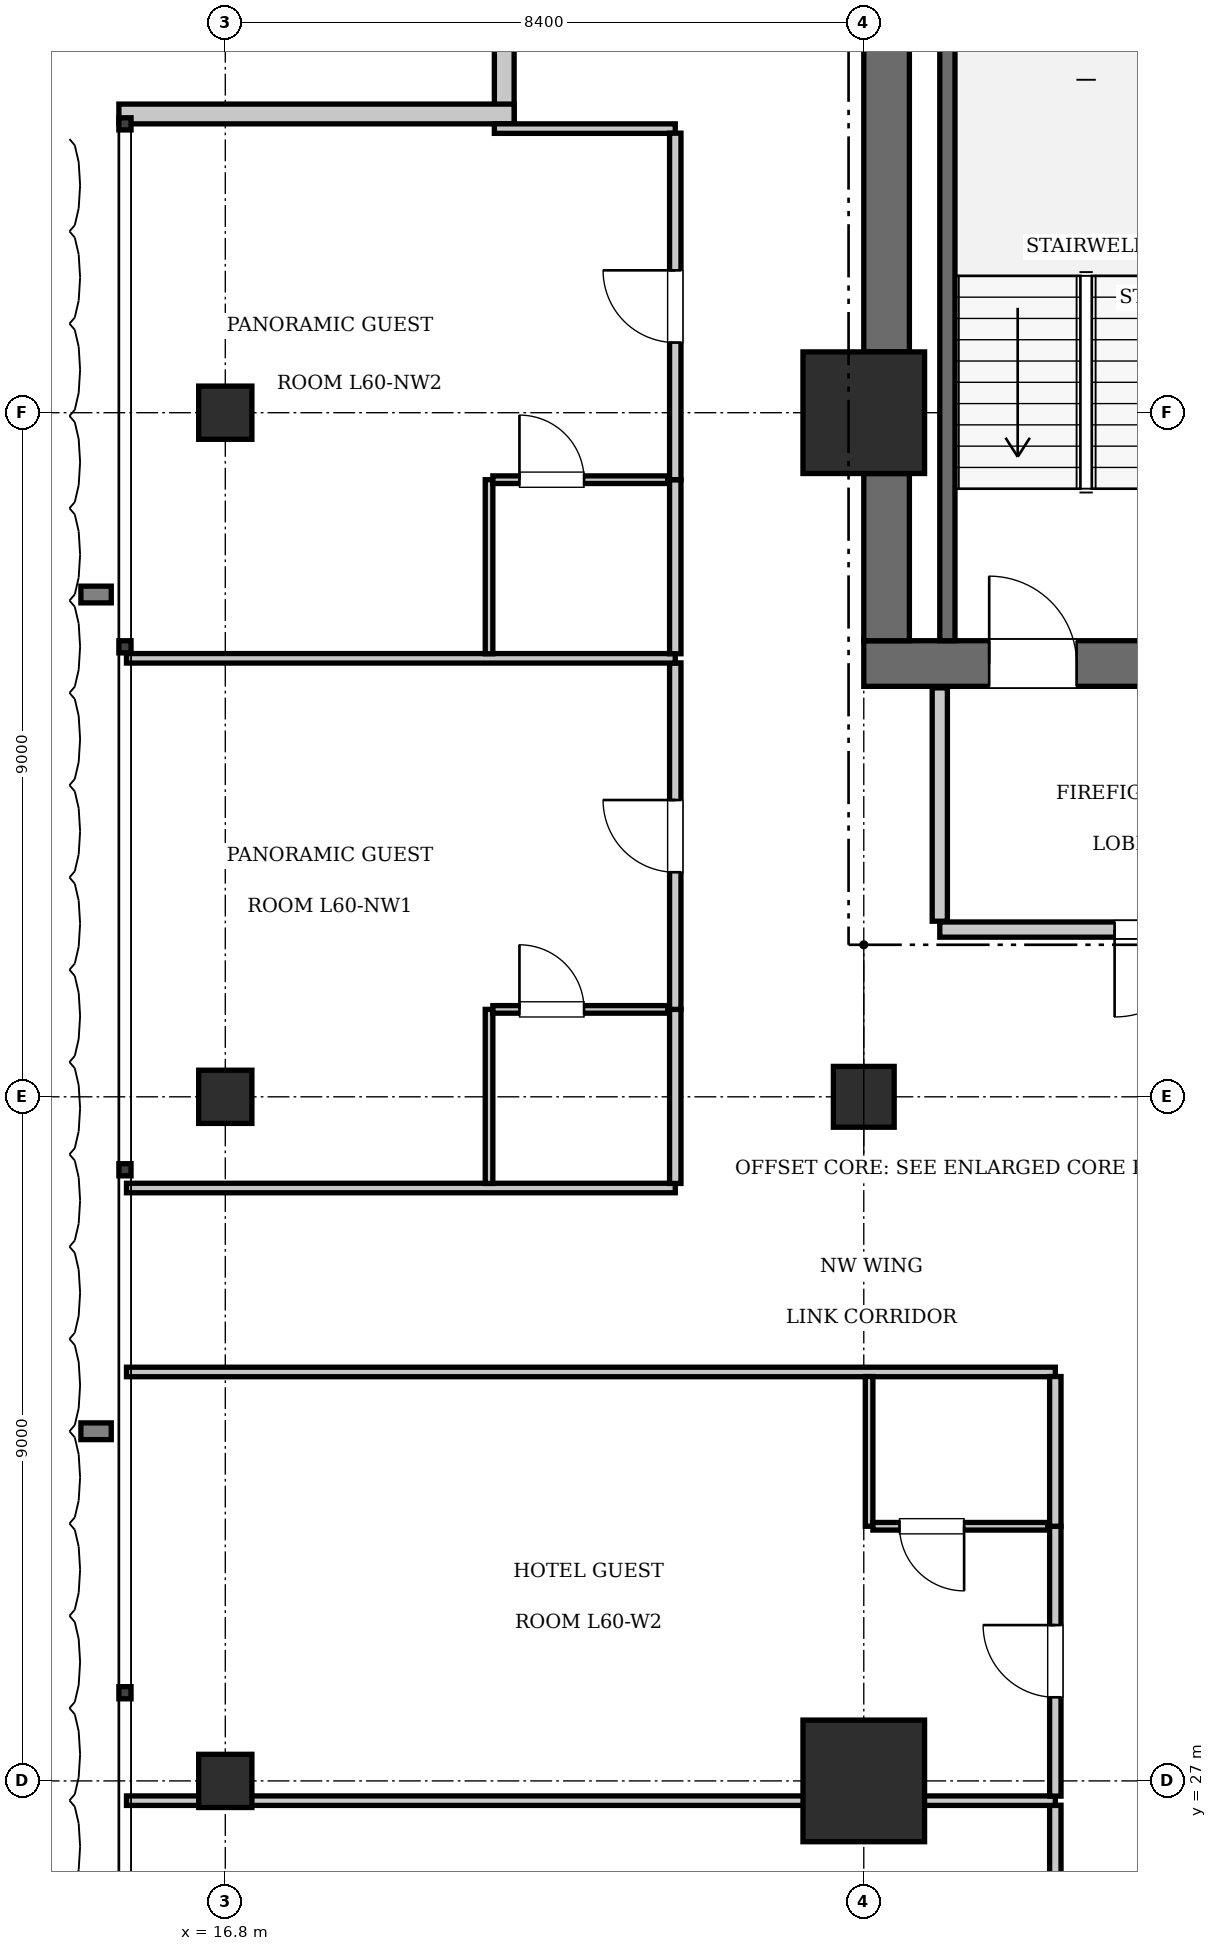
"""IFC4 building model, lengths in metres.
Left out: names, types, materials, properties, quantities, classifications, styles, units other than length and angle.
Written with IfcOpenShell. Run it as: python <this file> out.ifc"""

import sys

from ifc_helpers import new_model, si_unit, direction, frame, frame_2d, origin, origin_2d, place, context, subcontext, project, spatial, rectangle, extrude, element, fill, save


model = new_model("IFC4")
c1 = context("Model", 3, precision=1e-05, world=origin(), true_north=direction((0.0, 1.0)))
c2 = subcontext(c1, "Body", "Model", "MODEL_VIEW")
j1 = project(units=[si_unit("LENGTHUNIT", "METRE"), si_unit("PLANEANGLEUNIT", "RADIAN")], contexts=[c1])
p1 = place(None, origin())
s1 = spatial("IfcSite", under=j1, at=p1, CompositionType="ELEMENT")
p2 = place(p1, origin())
s2 = spatial("IfcBuilding", under=s1, at=p2, CompositionType="ELEMENT")
p3 = place(p2, frame((0.0, 0.0, 247.1)))
s3 = spatial("IfcBuildingStorey", under=s2, at=p3, CompositionType="ELEMENT", Elevation=247.1)
for number, where, z_axis, x_axis in (
    (1, (25.2, 27.0, 0.0), (0.0, 0.0, 1.0), (1.0, 0.0, 0.0)),
    (2, (25.2, 45.0, 0.0), (0.0, 0.0, 1.0), (1.0, 0.0, 0.0)),
):
    element("IfcColumn", number, at=place(p3, frame(where, z_axis=z_axis, x_axis=x_axis)), inside=s3, PredefinedType="COLUMN", context=c2, shape_type="SweptSolid", body=[
        extrude(rectangle(XDim=1.6, YDim=1.6, at=origin_2d()), origin(), (0.0, 0.0, 1.0), 3.85),
    ])
p4 = place(p3, frame((25.2, 41.7, 0.0), z_axis=(0.0, 0.0, 1.0), x_axis=(1.0, 0.0, 0.0)))
e3 = element("IfcWall", 3, at=p4, inside=s3, PredefinedType="SHEAR", context=c2, shape_type="SweptSolid", body=[
    extrude(rectangle(XDim=6.8, YDim=0.6, at=frame_2d((3.4, 0.0))), origin(), (0.0, 0.0, 1.0), 3.85),
])
p5 = place(p4, frame((1.65, 0.0, 0.0)))
e4 = element("IfcOpeningElement", 4, at=p5, cuts=e3, PredefinedType="OPENING", context=c2, shape_type="SweptSolid", body=[
    extrude(rectangle(XDim=1.15, YDim=2.15, at=frame_2d((0.575, 1.075))), frame((0.0, 0.31, 0.0), z_axis=(0.0, -1.0, 0.0), x_axis=(1.0, 0.0, 0.0)), (0.0, 0.0, 1.0), 0.62),
])
p6 = place(p4, frame((5.15, 0.0, 0.0)))
e5 = element("IfcOpeningElement", 5, at=p6, cuts=e3, PredefinedType="OPENING", context=c2, shape_type="SweptSolid", body=[
    extrude(rectangle(XDim=1.1, YDim=2.2, at=frame_2d((0.55, 1.1))), frame((0.0, 0.31, 0.0), z_axis=(0.0, -1.0, 0.0), x_axis=(1.0, 0.0, 0.0)), (0.0, 0.0, 1.0), 0.62),
])
p7 = place(p3, frame((25.5, 42.0, 0.0), z_axis=(0.0, 0.0, 1.0), x_axis=(0.0, 1.0, 0.0)))
e6 = element("IfcWall", 6, at=p7, inside=s3, PredefinedType="SHEAR", context=c2, shape_type="SweptSolid", body=[
    extrude(rectangle(XDim=2.2, YDim=0.6, at=frame_2d((1.1, 0.0))), origin(), (0.0, 0.0, 1.0), 3.85),
])
p8 = place(p3, frame((25.5, 45.8, 0.0), z_axis=(0.0, 0.0, 1.0), x_axis=(0.0, 1.0, 0.0)))
e7 = element("IfcWall", 7, at=p8, inside=s3, PredefinedType="SHEAR", context=c2, shape_type="SweptSolid", body=[
    extrude(rectangle(XDim=7.6, YDim=0.6, at=frame_2d((3.8, 0.0))), origin(), (0.0, 0.0, 1.0), 3.85),
])
p9 = place(p3, frame((25.2, 36.0, 0.0), z_axis=(0.0, 0.0, 1.0), x_axis=(1.0, 0.0, 0.0)))
e8 = element("IfcColumn", 8, at=p9, inside=s3, PredefinedType="COLUMN", context=c2, shape_type="SweptSolid", body=[
    extrude(rectangle(XDim=0.8, YDim=0.8, at=origin_2d()), origin(), (0.0, 0.0, 1.0), 3.85),
])
for number, where, z_axis, x_axis in (
    (9, (16.8, 27.0, 0.0), (0.0, 0.0, 1.0), (1.0, 0.0, 0.0)),
    (10, (16.8, 36.0, 0.0), (0.0, 0.0, 1.0), (1.0, 0.0, 0.0)),
    (11, (16.8, 45.0, 0.0), (0.0, 0.0, 1.0), (1.0, 0.0, 0.0)),
):
    element("IfcColumn", number, at=place(p3, frame(where, z_axis=z_axis, x_axis=x_axis)), inside=s3, PredefinedType="COLUMN", context=c2, shape_type="SweptSolid", body=[
        extrude(rectangle(XDim=0.7, YDim=0.7, at=origin_2d()), origin(), (0.0, 0.0, 1.0), 3.85),
    ])
p10 = place(p3, frame((26.3, 42.0, 0.0), z_axis=(0.0, 0.0, 1.0), x_axis=(0.0, 1.0, 0.0)))
e12 = element("IfcWall", 12, at=p10, inside=s3, PredefinedType="SOLIDWALL", context=c2, shape_type="SweptSolid", body=[
    extrude(rectangle(XDim=9.12, YDim=0.2, at=frame_2d((4.56, 0.0))), origin(), (0.0, 0.0, 1.0), 3.61),
])
p11 = place(p3, frame((20.47, 48.8, 0.0), z_axis=(0.0, 0.0, 1.0), x_axis=(0.0, 1.0, 0.0)))
e13 = element("IfcWall", 13, at=p11, inside=s3, PredefinedType="SOLIDWALL", context=c2, shape_type="SweptSolid", body=[
    extrude(rectangle(XDim=5.2, YDim=0.26, at=frame_2d((2.6, 0.0))), origin(), (0.0, 0.0, 1.0), 3.61),
])
p12 = place(p3, frame((15.4, 48.93, 0.0), z_axis=(0.0, 0.0, 1.0), x_axis=(1.0, 0.0, 0.0)))
e14 = element("IfcWall", 14, at=p12, inside=s3, PredefinedType="SOLIDWALL", context=c2, shape_type="SweptSolid", body=[
    extrude(rectangle(XDim=5.2, YDim=0.26, at=frame_2d((2.6, 0.0))), origin(), (0.0, 0.0, 1.0), 3.61),
])
p13 = place(p3, frame((26.2, 38.2, 0.0), z_axis=(0.0, 0.0, 1.0), x_axis=(1.0, 0.0, 0.0)))
e15 = element("IfcWall", 15, at=p13, inside=s3, PredefinedType="PARTITIONING", context=c2, shape_type="SweptSolid", body=[
    extrude(rectangle(XDim=5.8, YDim=0.2, at=frame_2d((2.9, 0.0))), origin(), (0.0, 0.0, 1.0), 3.61),
])
p14 = place(p13, frame((2.3, 0.0, 0.0)))
e16 = element("IfcOpeningElement", 16, at=p14, cuts=e15, PredefinedType="OPENING", context=c2, shape_type="SweptSolid", body=[
    extrude(rectangle(XDim=1.15, YDim=2.15, at=frame_2d((0.575, 1.075))), frame((0.0, 0.11, 0.0), z_axis=(0.0, -1.0, 0.0), x_axis=(1.0, 0.0, 0.0)), (0.0, 0.0, 1.0), 0.22),
])
p15 = place(p3, frame((26.2, 38.31, 0.0), z_axis=(0.0, 0.0, 1.0), x_axis=(0.0, 1.0, 0.0)))
e17 = element("IfcWall", 17, at=p15, inside=s3, PredefinedType="PARTITIONING", context=c2, shape_type="SweptSolid", body=[
    extrude(rectangle(XDim=3.07, YDim=0.2, at=frame_2d((1.535, 0.0))), origin(), (0.0, 0.0, 1.0), 3.61),
])
p16 = place(p3, frame((15.5, 32.38, 0.0), z_axis=(0.0, 0.0, 1.0), x_axis=(1.0, 0.0, 0.0)))
e18 = element("IfcWall", 18, at=p16, inside=s3, PredefinedType="PARTITIONING", context=c2, shape_type="SweptSolid", body=[
    extrude(rectangle(XDim=12.22, YDim=0.125, at=frame_2d((6.11, 0.0))), origin(), (0.0, 0.0, 1.0), 3.61),
])
p17 = place(p3, frame((27.72, 23.13, 0.0), z_axis=(0.0, 0.0, 1.0), x_axis=(0.0, 1.0, 0.0)))
e19 = element("IfcWall", 19, at=p17, inside=s3, PredefinedType="PARTITIONING", context=c2, shape_type="SweptSolid", body=[
    extrude(rectangle(XDim=3.55, YDim=0.15, at=frame_2d((1.775, 0.0))), origin(), (0.0, 0.0, 1.0), 3.61),
])
p18 = place(p17, frame((1.3, 0.0, 0.0)))
e20 = element("IfcOpeningElement", 20, at=p18, cuts=e19, PredefinedType="OPENING", context=c2, shape_type="SweptSolid", body=[
    extrude(rectangle(XDim=0.95, YDim=2.15, at=frame_2d((0.475, 1.075))), frame((0.0, 0.085, 0.0), z_axis=(0.0, -1.0, 0.0), x_axis=(1.0, 0.0, 0.0)), (0.0, 0.0, 1.0), 0.17),
])
p19 = place(p3, frame((15.5, 26.74, 0.0), z_axis=(0.0, 0.0, 1.0), x_axis=(1.0, 0.0, 0.0)))
e21 = element("IfcWall", 21, at=p19, inside=s3, PredefinedType="PARTITIONING", context=c2, shape_type="SweptSolid", body=[
    extrude(rectangle(XDim=12.22, YDim=0.125, at=frame_2d((6.11, 0.0))), origin(), (0.0, 0.0, 1.0), 2.41),
])
p20 = place(p3, frame((27.72, 26.8, 0.0), z_axis=(0.0, 0.0, 1.0), x_axis=(0.0, 1.0, 0.0)))
e22 = element("IfcWall", 22, at=p20, inside=s3, PredefinedType="PARTITIONING", context=c2, shape_type="SweptSolid", body=[
    extrude(rectangle(XDim=3.55, YDim=0.15, at=frame_2d((1.775, 0.0))), origin(), (0.0, 0.0, 1.0), 3.61),
])
p21 = place(p20, frame((1.3, 0.0, 0.0)))
e23 = element("IfcOpeningElement", 23, at=p21, cuts=e22, PredefinedType="OPENING", context=c2, shape_type="SweptSolid", body=[
    extrude(rectangle(XDim=0.95, YDim=2.15, at=frame_2d((0.475, 1.075))), frame((0.0, 0.085, 0.0), z_axis=(0.0, -1.0, 0.0), x_axis=(1.0, 0.0, 0.0)), (0.0, 0.0, 1.0), 0.17),
])
p22 = place(p3, frame((27.72, 30.35, 0.0), z_axis=(0.0, 0.0, 1.0), x_axis=(0.0, 1.0, 0.0)))
e24 = element("IfcWall", 24, at=p22, inside=s3, PredefinedType="PARTITIONING", context=c2, shape_type="SweptSolid", body=[
    extrude(rectangle(XDim=1.97, YDim=0.15, at=frame_2d((0.985, 0.0))), origin(), (0.0, 0.0, 1.0), 3.61),
])
p23 = place(p3, frame((25.27, 30.35, 0.0), z_axis=(0.0, 0.0, 1.0), x_axis=(0.0, 1.0, 0.0)))
e25 = element("IfcWall", 25, at=p23, inside=s3, PredefinedType="PARTITIONING", context=c2, shape_type="SweptSolid", body=[
    extrude(rectangle(XDim=1.97, YDim=0.1, at=frame_2d((0.985, 0.0))), origin(), (0.0, 0.0, 1.0), 3.077),
])
p24 = place(p3, frame((25.32, 30.35, 0.0), z_axis=(0.0, 0.0, 1.0), x_axis=(1.0, 0.0, 0.0)))
e26 = element("IfcWall", 26, at=p24, inside=s3, PredefinedType="PARTITIONING", context=c2, shape_type="SweptSolid", body=[
    extrude(rectangle(XDim=2.3, YDim=0.1, at=frame_2d((1.15, 0.0))), origin(), (0.0, 0.0, 1.0), 3.61),
])
p25 = place(p24, frame((0.35, 0.0, 0.0)))
e27 = element("IfcOpeningElement", 27, at=p25, cuts=e26, PredefinedType="OPENING", context=c2, shape_type="SweptSolid", body=[
    extrude(rectangle(XDim=0.85, YDim=2.1, at=frame_2d((0.425, 1.05))), frame((0.0, 0.06, 0.0), z_axis=(0.0, -1.0, 0.0), x_axis=(1.0, 0.0, 0.0)), (0.0, 0.0, 1.0), 0.12),
])
p26 = place(p3, frame((15.5, 34.8, 0.0), z_axis=(0.0, 0.0, 1.0), x_axis=(1.0, 0.0, 0.0)))
e28 = element("IfcWall", 28, at=p26, inside=s3, PredefinedType="PARTITIONING", context=c2, shape_type="SweptSolid", body=[
    extrude(rectangle(XDim=7.22, YDim=0.125, at=frame_2d((3.61, 0.0))), origin(), (0.0, 0.0, 1.0), 3.61),
])
p27 = place(p3, frame((20.34, 48.738, 0.0), z_axis=(0.0, 0.0, 1.0), x_axis=(1.0, 0.0, 0.0)))
e29 = element("IfcWall", 29, at=p27, inside=s3, PredefinedType="PARTITIONING", context=c2, shape_type="SweptSolid", body=[
    extrude(rectangle(XDim=2.38, YDim=0.125, at=frame_2d((1.19, 0.0))), origin(), (0.0, 0.0, 1.0), 3.61),
])
p28 = place(p3, frame((22.72, 34.86, 0.0), z_axis=(0.0, 0.0, 1.0), x_axis=(0.0, 1.0, 0.0)))
e30 = element("IfcWall", 30, at=p28, inside=s3, PredefinedType="PARTITIONING", context=c2, shape_type="SweptSolid", body=[
    extrude(rectangle(XDim=2.29, YDim=0.15, at=frame_2d((1.145, 0.0))), origin(), (0.0, 0.0, 1.0), 3.61),
])
p29 = place(p3, frame((22.72, 37.15, 0.0), z_axis=(0.0, 0.0, 1.0), x_axis=(0.0, 1.0, 0.0)))
e31 = element("IfcWall", 31, at=p29, inside=s3, PredefinedType="PARTITIONING", context=c2, shape_type="SweptSolid", body=[
    extrude(rectangle(XDim=4.559, YDim=0.15, at=frame_2d((2.279, 0.0))), origin(), (0.0, 0.0, 1.0), 3.61),
])
p30 = place(p29, frame((1.804, 0.0, 0.0)))
e32 = element("IfcOpeningElement", 32, at=p30, cuts=e31, PredefinedType="OPENING", context=c2, shape_type="SweptSolid", body=[
    extrude(rectangle(XDim=0.95, YDim=2.15, at=frame_2d((0.475, 1.075))), frame((0.0, 0.085, 0.0), z_axis=(0.0, -1.0, 0.0), x_axis=(1.0, 0.0, 0.0)), (0.0, 0.0, 1.0), 0.17),
])
p31 = place(p3, frame((20.27, 34.86, 0.0), z_axis=(0.0, 0.0, 1.0), x_axis=(0.0, 1.0, 0.0)))
e33 = element("IfcWall", 33, at=p31, inside=s3, PredefinedType="PARTITIONING", context=c2, shape_type="SweptSolid", body=[
    extrude(rectangle(XDim=2.29, YDim=0.1, at=frame_2d((1.145, 0.0))), origin(), (0.0, 0.0, 1.0), 3.61),
])
p32 = place(p3, frame((20.32, 37.15, 0.0), z_axis=(0.0, 0.0, 1.0), x_axis=(1.0, 0.0, 0.0)))
e34 = element("IfcWall", 34, at=p32, inside=s3, PredefinedType="PARTITIONING", context=c2, shape_type="SweptSolid", body=[
    extrude(rectangle(XDim=2.3, YDim=0.1, at=frame_2d((1.15, 0.0))), origin(), (0.0, 0.0, 1.0), 3.61),
])
p33 = place(p32, frame((0.35, 0.0, 0.0)))
e35 = element("IfcOpeningElement", 35, at=p33, cuts=e34, PredefinedType="OPENING", context=c2, shape_type="SweptSolid", body=[
    extrude(rectangle(XDim=0.85, YDim=2.1, at=frame_2d((0.425, 1.05))), frame((0.0, 0.06, 0.0), z_axis=(0.0, -1.0, 0.0), x_axis=(1.0, 0.0, 0.0)), (0.0, 0.0, 1.0), 0.12),
])
p34 = place(p3, frame((15.5, 41.769, 0.0), z_axis=(0.0, 0.0, 1.0), x_axis=(1.0, 0.0, 0.0)))
e36 = element("IfcWall", 36, at=p34, inside=s3, PredefinedType="PARTITIONING", context=c2, shape_type="SweptSolid", body=[
    extrude(rectangle(XDim=7.22, YDim=0.125, at=frame_2d((3.61, 0.0))), origin(), (0.0, 0.0, 1.0), 3.61),
])
p35 = place(p3, frame((22.72, 41.829, 0.0), z_axis=(0.0, 0.0, 1.0), x_axis=(0.0, 1.0, 0.0)))
e37 = element("IfcWall", 37, at=p35, inside=s3, PredefinedType="PARTITIONING", context=c2, shape_type="SweptSolid", body=[
    extrude(rectangle(XDim=2.29, YDim=0.15, at=frame_2d((1.145, 0.0))), origin(), (0.0, 0.0, 1.0), 3.61),
])
p36 = place(p3, frame((22.72, 44.119, 0.0), z_axis=(0.0, 0.0, 1.0), x_axis=(0.0, 1.0, 0.0)))
e38 = element("IfcWall", 38, at=p36, inside=s3, PredefinedType="PARTITIONING", context=c2, shape_type="SweptSolid", body=[
    extrude(rectangle(XDim=4.559, YDim=0.15, at=frame_2d((2.279, 0.0))), origin(), (0.0, 0.0, 1.0), 3.61),
])
p37 = place(p36, frame((1.804, 0.0, 0.0)))
e39 = element("IfcOpeningElement", 39, at=p37, cuts=e38, PredefinedType="OPENING", context=c2, shape_type="SweptSolid", body=[
    extrude(rectangle(XDim=0.95, YDim=2.15, at=frame_2d((0.475, 1.075))), frame((0.0, 0.085, 0.0), z_axis=(0.0, -1.0, 0.0), x_axis=(1.0, 0.0, 0.0)), (0.0, 0.0, 1.0), 0.17),
])
p38 = place(p3, frame((20.27, 41.829, 0.0), z_axis=(0.0, 0.0, 1.0), x_axis=(0.0, 1.0, 0.0)))
e40 = element("IfcWall", 40, at=p38, inside=s3, PredefinedType="PARTITIONING", context=c2, shape_type="SweptSolid", body=[
    extrude(rectangle(XDim=2.29, YDim=0.1, at=frame_2d((1.145, 0.0))), origin(), (0.0, 0.0, 1.0), 3.61),
])
p39 = place(p3, frame((20.32, 44.119, 0.0), z_axis=(0.0, 0.0, 1.0), x_axis=(1.0, 0.0, 0.0)))
e41 = element("IfcWall", 41, at=p39, inside=s3, PredefinedType="PARTITIONING", context=c2, shape_type="SweptSolid", body=[
    extrude(rectangle(XDim=2.3, YDim=0.1, at=frame_2d((1.15, 0.0))), origin(), (0.0, 0.0, 1.0), 3.61),
])
p40 = place(p39, frame((0.35, 0.0, 0.0)))
e42 = element("IfcOpeningElement", 42, at=p40, cuts=e41, PredefinedType="OPENING", context=c2, shape_type="SweptSolid", body=[
    extrude(rectangle(XDim=0.85, YDim=2.1, at=frame_2d((0.425, 1.05))), frame((0.0, 0.06, 0.0), z_axis=(0.0, -1.0, 0.0), x_axis=(1.0, 0.0, 0.0)), (0.0, 0.0, 1.0), 0.12),
])
p41 = place(p5, origin())
e43 = element("IfcDoor", 43, at=p41, inside=s3, OperationType="SINGLE_SWING_LEFT", PredefinedType="DOOR", context=c2, shape_type="SweptSolid", body=[
    extrude(rectangle(XDim=1.15, YDim=2.15, at=frame_2d((0.575, 1.075))), frame((0.0, 0.025, 0.0), z_axis=(0.0, -1.0, 0.0), x_axis=(1.0, 0.0, 0.0)), (0.0, 0.0, 1.0), 0.05),
])
fill(e4, e43)
p42 = place(p14, frame((1.15, 0.0, 0.0), z_axis=(0.0, 0.0, 1.0), x_axis=(-1.0, 0.0, 0.0)))
e44 = element("IfcDoor", 44, at=p42, inside=s3, OperationType="SINGLE_SWING_RIGHT", PredefinedType="DOOR", context=c2, shape_type="SweptSolid", body=[
    extrude(rectangle(XDim=1.15, YDim=2.15, at=frame_2d((0.575, 1.075))), frame((0.0, 0.025, 0.0), z_axis=(0.0, -1.0, 0.0), x_axis=(1.0, 0.0, 0.0)), (0.0, 0.0, 1.0), 0.05),
])
fill(e16, e44)
p43 = place(p25, frame((0.85, 0.0, 0.0), z_axis=(0.0, 0.0, 1.0), x_axis=(-1.0, 0.0, 0.0)))
e45 = element("IfcDoor", 45, at=p43, inside=s3, OperationType="SINGLE_SWING_LEFT", PredefinedType="DOOR", context=c2, shape_type="SweptSolid", body=[
    extrude(rectangle(XDim=0.85, YDim=2.1, at=frame_2d((0.425, 1.05))), frame((0.0, 0.025, 0.0), z_axis=(0.0, -1.0, 0.0), x_axis=(1.0, 0.0, 0.0)), (0.0, 0.0, 1.0), 0.05),
])
fill(e27, e45)
p44 = place(p21, origin())
e46 = element("IfcDoor", 46, at=p44, inside=s3, OperationType="SINGLE_SWING_RIGHT", PredefinedType="DOOR", context=c2, shape_type="SweptSolid", body=[
    extrude(rectangle(XDim=0.95, YDim=2.15, at=frame_2d((0.475, 1.075))), frame((0.0, 0.025, 0.0), z_axis=(0.0, -1.0, 0.0), x_axis=(1.0, 0.0, 0.0)), (0.0, 0.0, 1.0), 0.05),
])
fill(e23, e46)
p45 = place(p33, origin())
e47 = element("IfcDoor", 47, at=p45, inside=s3, OperationType="SINGLE_SWING_LEFT", PredefinedType="DOOR", context=c2, shape_type="SweptSolid", body=[
    extrude(rectangle(XDim=0.85, YDim=2.1, at=frame_2d((0.425, 1.05))), frame((0.0, 0.025, 0.0), z_axis=(0.0, -1.0, 0.0), x_axis=(1.0, 0.0, 0.0)), (0.0, 0.0, 1.0), 0.05),
])
fill(e35, e47)
p46 = place(p30, origin())
e48 = element("IfcDoor", 48, at=p46, inside=s3, OperationType="SINGLE_SWING_RIGHT", PredefinedType="DOOR", context=c2, shape_type="SweptSolid", body=[
    extrude(rectangle(XDim=0.95, YDim=2.15, at=frame_2d((0.475, 1.075))), frame((0.0, 0.025, 0.0), z_axis=(0.0, -1.0, 0.0), x_axis=(1.0, 0.0, 0.0)), (0.0, 0.0, 1.0), 0.05),
])
fill(e32, e48)
p47 = place(p40, origin())
e49 = element("IfcDoor", 49, at=p47, inside=s3, OperationType="SINGLE_SWING_LEFT", PredefinedType="DOOR", context=c2, shape_type="SweptSolid", body=[
    extrude(rectangle(XDim=0.85, YDim=2.1, at=frame_2d((0.425, 1.05))), frame((0.0, 0.025, 0.0), z_axis=(0.0, -1.0, 0.0), x_axis=(1.0, 0.0, 0.0)), (0.0, 0.0, 1.0), 0.05),
])
fill(e42, e49)
p48 = place(p37, origin())
e50 = element("IfcDoor", 50, at=p48, inside=s3, OperationType="SINGLE_SWING_RIGHT", PredefinedType="DOOR", context=c2, shape_type="SweptSolid", body=[
    extrude(rectangle(XDim=0.95, YDim=2.15, at=frame_2d((0.475, 1.075))), frame((0.0, 0.025, 0.0), z_axis=(0.0, -1.0, 0.0), x_axis=(1.0, 0.0, 0.0)), (0.0, 0.0, 1.0), 0.05),
])
fill(e39, e50)
save(model, sys.argv[1])
